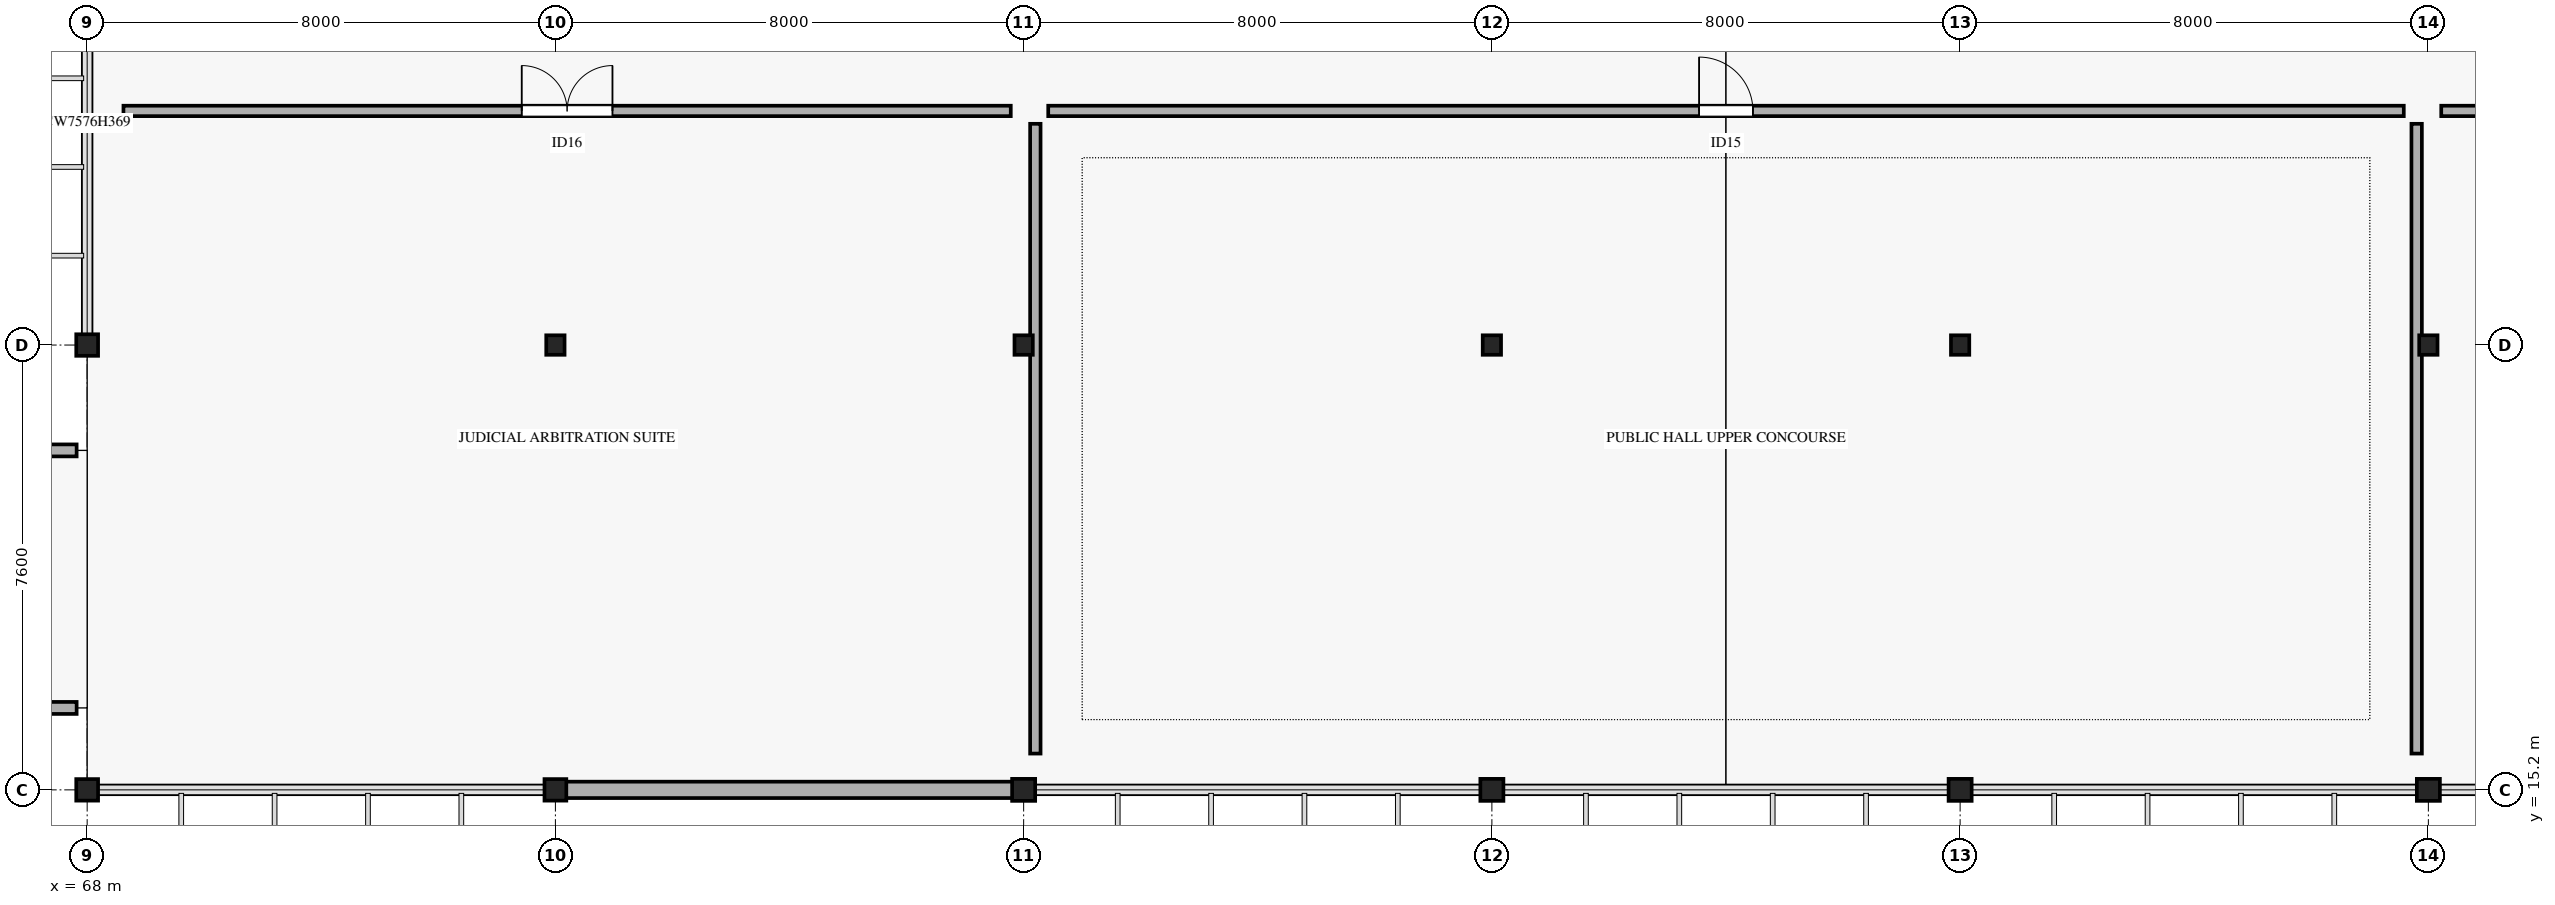
"""IFC4 building model, lengths in metres.
Left out: names, types, materials, properties, quantities, classifications, styles, units other than length and angle.
Written with IfcOpenShell. Run it as: python <this file> out.ifc"""

import sys

from ifc_helpers import new_model, si_unit, direction, frame, frame_2d, origin, origin_2d, place, context, subcontext, project, spatial, rectangle, i_section, extrude, element, fill, save


model = new_model("IFC4")
c1 = context("Model", 3, precision=1e-05, world=origin(), true_north=direction((0.0, 1.0)))
c2 = subcontext(c1, "Body", "Model", "MODEL_VIEW")
j1 = project(units=[si_unit("LENGTHUNIT", "METRE"), si_unit("PLANEANGLEUNIT", "RADIAN")], contexts=[c1])
p1 = place(None, origin())
s1 = spatial("IfcSite", under=j1, at=p1, CompositionType="ELEMENT")
p2 = place(p1, origin())
s2 = spatial("IfcBuilding", under=s1, at=p2, CompositionType="ELEMENT")
p3 = place(p2, frame((0.0, 0.0, 20.4)))
s3 = spatial("IfcBuildingStorey", under=s2, at=p3, CompositionType="ELEMENT", Elevation=20.4)
for number, where, z_axis, x_axis in (
    (1, (68.0, 15.2, 0.0), (0.0, 0.0, 1.0), (1.0, 0.0, 0.0)),
    (2, (68.0, 22.8, 0.0), (0.0, 0.0, 1.0), (1.0, 0.0, 0.0)),
    (3, (76.0, 15.2, 0.0), (0.0, 0.0, 1.0), (1.0, 0.0, 0.0)),
):
    element("IfcColumn", number, at=place(p3, frame(where, z_axis=z_axis, x_axis=x_axis)), inside=s3, PredefinedType="COLUMN", context=c2, shape_type="SweptSolid", body=[
        extrude(i_section(OverallWidth=0.373, OverallDepth=0.368, WebThickness=0.015, FlangeThickness=0.024, FilletRadius=0.015, at=origin_2d()), origin(), (0.0, 0.0, 1.0), 4.595),
    ])
p4 = place(p3, frame((76.0, 22.8, 0.0), z_axis=(0.0, 0.0, 1.0), x_axis=(1.0, 0.0, 0.0)))
e4 = element("IfcColumn", 4, at=p4, inside=s3, PredefinedType="COLUMN", context=c2, shape_type="SweptSolid", body=[
    extrude(i_section(OverallWidth=0.313, OverallDepth=0.333, WebThickness=0.018, FlangeThickness=0.028, FilletRadius=0.015, at=origin_2d()), origin(), (0.0, 0.0, 1.0), 4.595),
])
p5 = place(p3, frame((84.0, 15.2, 0.0), z_axis=(0.0, 0.0, 1.0), x_axis=(1.0, 0.0, 0.0)))
e5 = element("IfcColumn", 5, at=p5, inside=s3, PredefinedType="COLUMN", context=c2, shape_type="SweptSolid", body=[
    extrude(i_section(OverallWidth=0.394, OverallDepth=0.376, WebThickness=0.017, FlangeThickness=0.028, FilletRadius=0.015, at=origin_2d()), origin(), (0.0, 0.0, 1.0), 4.595),
])
p6 = place(p3, frame((84.0, 22.8, 0.0), z_axis=(0.0, 0.0, 1.0), x_axis=(1.0, 0.0, 0.0)))
e6 = element("IfcColumn", 6, at=p6, inside=s3, PredefinedType="COLUMN", context=c2, shape_type="SweptSolid", body=[
    extrude(i_section(OverallWidth=0.313, OverallDepth=0.333, WebThickness=0.018, FlangeThickness=0.028, FilletRadius=0.015, at=origin_2d()), origin(), (0.0, 0.0, 1.0), 4.595),
])
p7 = place(p3, frame((92.0, 15.2, 0.0), z_axis=(0.0, 0.0, 1.0), x_axis=(1.0, 0.0, 0.0)))
e7 = element("IfcColumn", 7, at=p7, inside=s3, PredefinedType="COLUMN", context=c2, shape_type="SweptSolid", body=[
    extrude(i_section(OverallWidth=0.394, OverallDepth=0.376, WebThickness=0.017, FlangeThickness=0.028, FilletRadius=0.015, at=origin_2d()), origin(), (0.0, 0.0, 1.0), 4.595),
])
p8 = place(p3, frame((92.0, 22.8, 0.0), z_axis=(0.0, 0.0, 1.0), x_axis=(1.0, 0.0, 0.0)))
e8 = element("IfcColumn", 8, at=p8, inside=s3, PredefinedType="COLUMN", context=c2, shape_type="SweptSolid", body=[
    extrude(i_section(OverallWidth=0.313, OverallDepth=0.333, WebThickness=0.018, FlangeThickness=0.028, FilletRadius=0.015, at=origin_2d()), origin(), (0.0, 0.0, 1.0), 4.595),
])
p9 = place(p3, frame((100.0, 15.2, 0.0), z_axis=(0.0, 0.0, 1.0), x_axis=(1.0, 0.0, 0.0)))
e9 = element("IfcColumn", 9, at=p9, inside=s3, PredefinedType="COLUMN", context=c2, shape_type="SweptSolid", body=[
    extrude(i_section(OverallWidth=0.394, OverallDepth=0.376, WebThickness=0.017, FlangeThickness=0.028, FilletRadius=0.015, at=origin_2d()), origin(), (0.0, 0.0, 1.0), 4.595),
])
p10 = place(p3, frame((100.0, 22.8, 0.0), z_axis=(0.0, 0.0, 1.0), x_axis=(1.0, 0.0, 0.0)))
e10 = element("IfcColumn", 10, at=p10, inside=s3, PredefinedType="COLUMN", context=c2, shape_type="SweptSolid", body=[
    extrude(i_section(OverallWidth=0.313, OverallDepth=0.333, WebThickness=0.018, FlangeThickness=0.028, FilletRadius=0.015, at=origin_2d()), origin(), (0.0, 0.0, 1.0), 4.595),
])
p11 = place(p3, frame((108.0, 15.2, 0.0), z_axis=(0.0, 0.0, 1.0), x_axis=(1.0, 0.0, 0.0)))
e11 = element("IfcColumn", 11, at=p11, inside=s3, PredefinedType="COLUMN", context=c2, shape_type="SweptSolid", body=[
    extrude(i_section(OverallWidth=0.394, OverallDepth=0.376, WebThickness=0.017, FlangeThickness=0.028, FilletRadius=0.015, at=origin_2d()), origin(), (0.0, 0.0, 1.0), 4.595),
])
p12 = place(p3, frame((108.0, 22.8, 0.0), z_axis=(0.0, 0.0, 1.0), x_axis=(1.0, 0.0, 0.0)))
e12 = element("IfcColumn", 12, at=p12, inside=s3, PredefinedType="COLUMN", context=c2, shape_type="SweptSolid", body=[
    extrude(i_section(OverallWidth=0.313, OverallDepth=0.333, WebThickness=0.018, FlangeThickness=0.028, FilletRadius=0.015, at=origin_2d()), origin(), (0.0, 0.0, 1.0), 4.595),
])
p13 = place(p3, frame((84.02, 15.2, 0.0), z_axis=(0.0, 0.0, 1.0), x_axis=(-1.0, 0.0, 0.0)))
e13 = element("IfcWall", 13, at=p13, inside=s3, PredefinedType="STANDARD", context=c2, shape_type="SweptSolid", body=[
    extrude(rectangle(XDim=8.04, YDim=0.28, at=frame_2d((4.02, 0.0))), origin(), (0.0, 0.0, 1.0), 3.66),
])
for number, where, z_axis, x_axis in (
    (14, (67.82, 16.6, 0.0), (0.0, 0.0, 1.0), (-1.0, 0.0, 0.0)),
    (15, (66.58, 21.0, 0.0), (0.0, 0.0, 1.0), (1.0, 0.0, 0.0)),
):
    element("IfcWall", number, at=place(p3, frame(where, z_axis=z_axis, x_axis=x_axis)), inside=s3, PredefinedType="STANDARD", context=c2, shape_type="SweptSolid", body=[
        extrude(rectangle(XDim=1.24, YDim=0.205, at=frame_2d((0.62, 0.0))), origin(), (0.0, 0.0, 1.0), 4.02),
    ])
p14 = place(p3, frame((84.42, 26.8, 0.0), z_axis=(0.0, 0.0, 1.0), x_axis=(1.0, 0.0, 0.0)))
e16 = element("IfcWall", 16, at=p14, inside=s3, PredefinedType="PARTITIONING", context=c2, shape_type="SweptSolid", body=[
    extrude(rectangle(XDim=23.16, YDim=0.178, at=frame_2d((11.58, 0.0))), origin(), (0.0, 0.0, 1.0), 3.45),
])
p15 = place(p14, frame((11.12, 0.0, 0.0)))
e17 = element("IfcOpeningElement", 17, at=p15, cuts=e16, PredefinedType="OPENING", context=c2, shape_type="SweptSolid", body=[
    extrude(rectangle(XDim=0.92, YDim=2.2, at=frame_2d((0.46, 1.1))), frame((0.0, 0.099, 0.0), z_axis=(0.0, -1.0, 0.0), x_axis=(1.0, 0.0, 0.0)), (0.0, 0.0, 1.0), 0.198),
])
for number, where, z_axis, x_axis in (
    (18, (107.8, 15.82, 0.0), (0.0, 0.0, 1.0), (0.0, 1.0, 0.0)),
    (19, (84.2, 15.82, 0.0), (0.0, 0.0, 1.0), (0.0, 1.0, 0.0)),
):
    element("IfcWall", number, at=place(p3, frame(where, z_axis=z_axis, x_axis=x_axis)), inside=s3, PredefinedType="PARTITIONING", context=c2, shape_type="SweptSolid", body=[
        extrude(rectangle(XDim=10.76, YDim=0.178, at=frame_2d((5.38, 0.0))), origin(), (0.0, 0.0, 1.0), 3.45),
    ])
p16 = place(p3, frame((68.62, 26.8, 0.0), z_axis=(0.0, 0.0, 1.0), x_axis=(1.0, 0.0, 0.0)))
e20 = element("IfcWall", 20, at=p16, inside=s3, PredefinedType="PARTITIONING", context=c2, shape_type="SweptSolid", body=[
    extrude(rectangle(XDim=15.16, YDim=0.178, at=frame_2d((7.58, 0.0))), origin(), (0.0, 0.0, 1.0), 3.45),
])
p17 = place(p16, frame((6.805, 0.0, 0.0)))
e21 = element("IfcOpeningElement", 21, at=p17, cuts=e20, PredefinedType="OPENING", context=c2, shape_type="SweptSolid", body=[
    extrude(rectangle(XDim=1.55, YDim=2.3, at=frame_2d((0.775, 1.15))), frame((0.0, 0.099, 0.0), z_axis=(0.0, -1.0, 0.0), x_axis=(1.0, 0.0, 0.0)), (0.0, 0.0, 1.0), 0.198),
])
p18 = place(p3, frame((108.22, 26.8, 0.0), z_axis=(0.0, 0.0, 1.0), x_axis=(1.0, 0.0, 0.0)))
e22 = element("IfcWall", 22, at=p18, inside=s3, PredefinedType="PARTITIONING", context=c2, shape_type="SweptSolid", body=[
    extrude(rectangle(XDim=15.16, YDim=0.178, at=frame_2d((7.58, 0.0))), origin(), (0.0, 0.0, 1.0), 3.45),
])
p19 = place(p18, frame((6.855, 0.0, 0.0)))
e23 = element("IfcOpeningElement", 23, at=p19, cuts=e22, PredefinedType="OPENING", context=c2, shape_type="SweptSolid", body=[
    extrude(rectangle(XDim=1.45, YDim=2.25, at=frame_2d((0.725, 1.125))), frame((0.0, 0.099, 0.0), z_axis=(0.0, -1.0, 0.0), x_axis=(1.0, 0.0, 0.0)), (0.0, 0.0, 1.0), 0.198),
])
p20 = place(p15, origin())
e24 = element("IfcDoor", 24, at=p20, inside=s3, OperationType="SINGLE_SWING_LEFT", PredefinedType="DOOR", context=c2, shape_type="SweptSolid", body=[
    extrude(rectangle(XDim=0.92, YDim=2.2, at=frame_2d((0.46, 1.1))), frame((0.0, 0.025, 0.0), z_axis=(0.0, -1.0, 0.0), x_axis=(1.0, 0.0, 0.0)), (0.0, 0.0, 1.0), 0.05),
])
fill(e17, e24)
p21 = place(p17, origin())
e25 = element("IfcDoor", 25, at=p21, inside=s3, OperationType="DOUBLE_DOOR_SINGLE_SWING", PredefinedType="DOOR", context=c2, shape_type="SweptSolid", body=[
    extrude(rectangle(XDim=1.55, YDim=2.3, at=frame_2d((0.775, 1.15))), frame((0.0, 0.025, 0.0), z_axis=(0.0, -1.0, 0.0), x_axis=(1.0, 0.0, 0.0)), (0.0, 0.0, 1.0), 0.05),
])
fill(e21, e25)
save(model, sys.argv[1])
